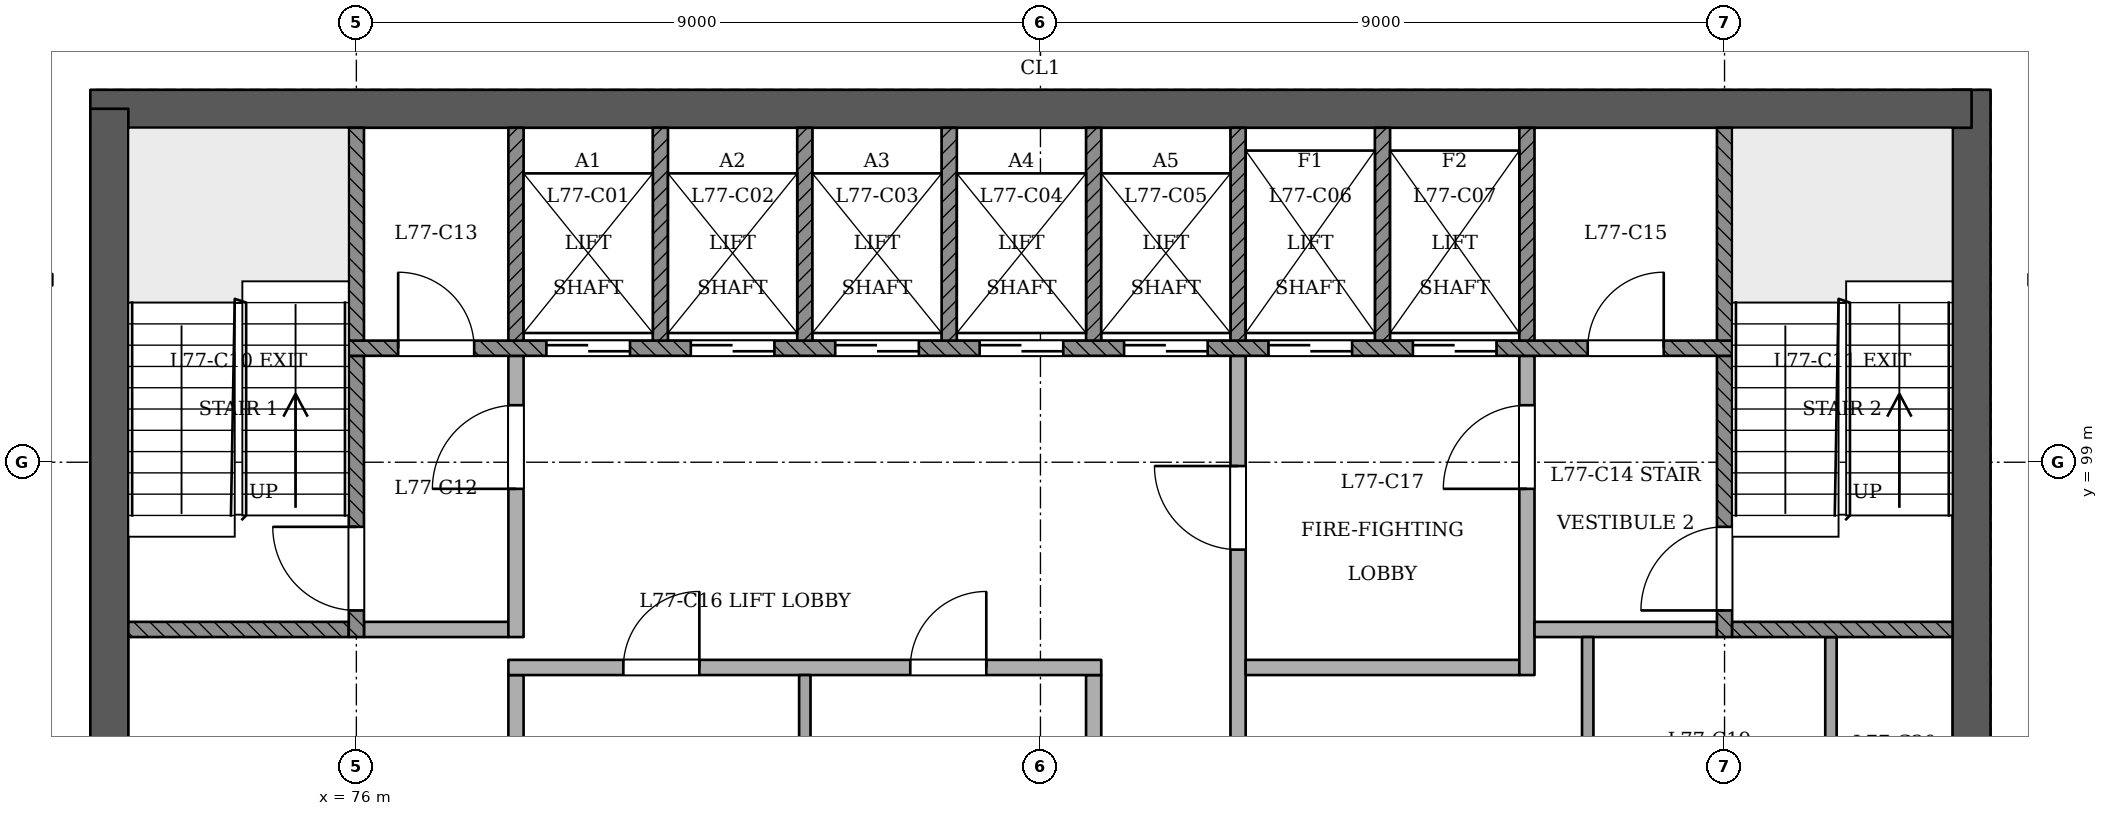
"""IFC4 building model, lengths in metres.
Left out: names, types, materials, properties, quantities, classifications, styles, units other than length and angle.
Written with IfcOpenShell. Run it as: python <this file> out.ifc"""

import sys

from ifc_helpers import new_model, si_unit, direction, frame, frame_2d, origin, place, context, subcontext, project, spatial, rectangle, extrude, element, fill, save


model = new_model("IFC4")
c1 = context("Model", 3, precision=1e-05, world=origin(), true_north=direction((0.0, 1.0)))
c2 = subcontext(c1, "Body", "Model", "MODEL_VIEW")
j1 = project(units=[si_unit("LENGTHUNIT", "METRE"), si_unit("PLANEANGLEUNIT", "RADIAN")], contexts=[c1])
p1 = place(None, origin())
s1 = spatial("IfcSite", under=j1, at=p1, CompositionType="ELEMENT")
p2 = place(p1, origin())
s2 = spatial("IfcBuilding", under=s1, at=p2, CompositionType="ELEMENT")
p3 = place(p2, frame((0.0, 0.0, 298.6)))
s3 = spatial("IfcBuildingStorey", under=s2, at=p3, CompositionType="ELEMENT", Elevation=298.6)
p4 = place(p3, frame((97.25, 93.15, 0.0), z_axis=(0.0, 0.0, 1.0), x_axis=(0.0, 1.0, 0.0)))
e1 = element("IfcWall", 1, at=p4, inside=s3, PredefinedType="SHEAR", context=c2, shape_type="SweptSolid", body=[
    extrude(rectangle(XDim=10.75, YDim=0.5, at=frame_2d((5.375, 0.0))), origin(), (0.0, 0.0, 1.0), 3.6),
])
p5 = place(p3, frame((97.25, 103.65, 0.0), z_axis=(0.0, 0.0, 1.0), x_axis=(-1.0, 0.0, 0.0)))
e2 = element("IfcWall", 2, at=p5, inside=s3, PredefinedType="SHEAR", context=c2, shape_type="SweptSolid", body=[
    extrude(rectangle(XDim=24.75, YDim=0.5, at=frame_2d((12.375, 0.0))), origin(), (0.0, 0.0, 1.0), 3.6),
])
p6 = place(p3, frame((72.75, 103.65, 0.0), z_axis=(0.0, 0.0, 1.0), x_axis=(0.0, -1.0, 0.0)))
e3 = element("IfcWall", 3, at=p6, inside=s3, PredefinedType="SHEAR", context=c2, shape_type="SweptSolid", body=[
    extrude(rectangle(XDim=10.75, YDim=0.5, at=frame_2d((5.375, 0.0))), origin(), (0.0, 0.0, 1.0), 3.6),
])
for number, where, z_axis, x_axis in (
    (4, (99.726, 101.401, 0.0), (0.0, 0.0, 1.0), (-1.0, 0.0, 0.0)),
    (5, (72.0, 101.401, 0.0), (0.0, 0.0, 1.0), (-1.0, -0.0, 0.0)),
):
    element("IfcWall", number, at=place(p3, frame(where, z_axis=z_axis, x_axis=x_axis)), inside=s3, PredefinedType="PARTITIONING", context=c2, shape_type="SweptSolid", body=[
        extrude(rectangle(XDim=1.726, YDim=0.15, at=frame_2d((0.863, 0.0))), origin(), (0.0, 0.0, 1.0), 3.2),
    ])
p7 = place(p3, frame((78.1, 93.4, 0.0), z_axis=(0.0, 0.0, 1.0), x_axis=(0.0, 1.0, 0.0)))
e6 = element("IfcWall", 6, at=p7, inside=s3, PredefinedType="PARTITIONING", context=c2, shape_type="SweptSolid", body=[
    extrude(rectangle(XDim=2.8, YDim=0.2, at=frame_2d((1.4, 0.0))), origin(), (0.0, 0.0, 1.0), 3.2),
])
p8 = place(p3, frame((81.9, 93.4, 0.0), z_axis=(0.0, 0.0, 1.0), x_axis=(0.0, 1.0, 0.0)))
e7 = element("IfcWall", 7, at=p8, inside=s3, PredefinedType="PARTITIONING", context=c2, shape_type="SweptSolid", body=[
    extrude(rectangle(XDim=2.8, YDim=0.15, at=frame_2d((1.4, 0.0))), origin(), (0.0, 0.0, 1.0), 3.2),
])
p9 = place(p3, frame((85.7, 93.4, 0.0), z_axis=(0.0, 0.0, 1.0), x_axis=(0.0, 1.0, 0.0)))
e8 = element("IfcWall", 8, at=p9, inside=s3, PredefinedType="PARTITIONING", context=c2, shape_type="SweptSolid", body=[
    extrude(rectangle(XDim=2.8, YDim=0.2, at=frame_2d((1.4, 0.0))), origin(), (0.0, 0.0, 1.0), 3.2),
])
p10 = place(p3, frame((87.6, 93.4, 0.0), z_axis=(0.0, 0.0, 1.0), x_axis=(0.0, 1.0, 0.0)))
e9 = element("IfcWall", 9, at=p10, inside=s3, PredefinedType="PARTITIONING", context=c2, shape_type="SweptSolid", body=[
    extrude(rectangle(XDim=7.0, YDim=0.2, at=frame_2d((3.5, 0.0))), origin(), (0.0, 0.0, 1.0), 3.2),
])
p11 = place(p10, frame((4.45, 0.0, 0.0)))
e10 = element("IfcOpeningElement", 10, at=p11, cuts=e9, PredefinedType="OPENING", context=c2, shape_type="SweptSolid", body=[
    extrude(rectangle(XDim=1.1, YDim=2.1, at=frame_2d((0.55, 1.05))), frame((0.0, 0.11, 0.0), z_axis=(0.0, -1.0, 0.0), x_axis=(1.0, 0.0, 0.0)), (0.0, 0.0, 1.0), 0.221),
])
for number, where, z_axis, x_axis in (
    (11, (92.2, 93.4, 0.0), (0.0, 0.0, 1.0), (0.0, 1.0, 0.0)),
    (12, (95.4, 93.4, 0.0), (0.0, 0.0, 1.0), (0.0, 1.0, 0.0)),
):
    element("IfcWall", number, at=place(p3, frame(where, z_axis=z_axis, x_axis=x_axis)), inside=s3, PredefinedType="PARTITIONING", context=c2, shape_type="SweptSolid", body=[
        extrude(rectangle(XDim=3.3, YDim=0.15, at=frame_2d((1.65, 0.0))), origin(), (0.0, 0.0, 1.0), 3.2),
    ])
p12 = place(p3, frame((78.0, 96.3, 0.0), z_axis=(0.0, 0.0, 1.0), x_axis=(1.0, 0.0, 0.0)))
e13 = element("IfcWall", 13, at=p12, inside=s3, PredefinedType="PARTITIONING", context=c2, shape_type="SweptSolid", body=[
    extrude(rectangle(XDim=7.8, YDim=0.2, at=frame_2d((3.9, 0.0))), origin(), (0.0, 0.0, 1.0), 3.2),
])
p13 = place(p12, frame((1.512, 0.0, 0.0)))
e14 = element("IfcOpeningElement", 14, at=p13, cuts=e13, PredefinedType="OPENING", context=c2, shape_type="SweptSolid", body=[
    extrude(rectangle(XDim=1.0, YDim=2.1, at=frame_2d((0.5, 1.05))), frame((0.0, 0.11, 0.0), z_axis=(0.0, -1.0, 0.0), x_axis=(1.0, 0.0, 0.0)), (0.0, 0.0, 1.0), 0.221),
])
p14 = place(p12, frame((5.288, 0.0, 0.0)))
e15 = element("IfcOpeningElement", 15, at=p14, cuts=e13, PredefinedType="OPENING", context=c2, shape_type="SweptSolid", body=[
    extrude(rectangle(XDim=1.0, YDim=2.1, at=frame_2d((0.5, 1.05))), frame((0.0, 0.11, 0.0), z_axis=(0.0, -1.0, 0.0), x_axis=(1.0, 0.0, 0.0)), (0.0, 0.0, 1.0), 0.221),
])
p15 = place(p3, frame((87.7, 96.3, 0.0), z_axis=(0.0, 0.0, 1.0), x_axis=(1.0, 0.0, 0.0)))
e16 = element("IfcWall", 16, at=p15, inside=s3, PredefinedType="PARTITIONING", context=c2, shape_type="SweptSolid", body=[
    extrude(rectangle(XDim=3.6, YDim=0.2, at=frame_2d((1.8, 0.0))), origin(), (0.0, 0.0, 1.0), 3.2),
])
p16 = place(p3, frame((91.4, 96.2, 0.0), z_axis=(0.0, 0.0, 1.0), x_axis=(0.0, 1.0, 0.0)))
e17 = element("IfcWall", 17, at=p16, inside=s3, PredefinedType="PARTITIONING", context=c2, shape_type="SweptSolid", body=[
    extrude(rectangle(XDim=4.2, YDim=0.2, at=frame_2d((2.1, 0.0))), origin(), (0.0, 0.0, 1.0), 3.2),
])
p17 = place(p16, frame((2.45, 0.0, 0.0)))
e18 = element("IfcOpeningElement", 18, at=p17, cuts=e17, PredefinedType="OPENING", context=c2, shape_type="SweptSolid", body=[
    extrude(rectangle(XDim=1.1, YDim=2.1, at=frame_2d((0.55, 1.05))), frame((0.0, 0.11, 0.0), z_axis=(0.0, -1.0, 0.0), x_axis=(1.0, 0.0, 0.0)), (0.0, 0.0, 1.0), 0.221),
])
p18 = place(p3, frame((73.0, 96.8, 0.0), z_axis=(0.0, 0.0, 1.0), x_axis=(1.0, 0.0, 0.0)))
e19 = element("IfcWall", 19, at=p18, inside=s3, PredefinedType="SOLIDWALL", context=c2, shape_type="SweptSolid", body=[
    extrude(rectangle(XDim=2.9, YDim=0.2, at=frame_2d((1.45, 0.0))), origin(), (0.0, 0.0, 1.0), 3.2),
])
p19 = place(p3, frame((76.0, 96.7, 0.0), z_axis=(0.0, 0.0, 1.0), x_axis=(0.0, 1.0, 0.0)))
e20 = element("IfcWall", 20, at=p19, inside=s3, PredefinedType="SOLIDWALL", context=c2, shape_type="SweptSolid", body=[
    extrude(rectangle(XDim=3.7, YDim=0.2, at=frame_2d((1.85, 0.0))), origin(), (0.0, 0.0, 1.0), 3.2),
])
p20 = place(p19, frame((0.35, 0.0, 0.0)))
e21 = element("IfcOpeningElement", 21, at=p20, cuts=e20, PredefinedType="OPENING", context=c2, shape_type="SweptSolid", body=[
    extrude(rectangle(XDim=1.1, YDim=2.1, at=frame_2d((0.55, 1.05))), frame((0.0, 0.11, 0.0), z_axis=(0.0, -1.0, 0.0), x_axis=(1.0, 0.0, 0.0)), (0.0, 0.0, 1.0), 0.221),
])
p21 = place(p3, frame((76.1, 96.8, 0.0), z_axis=(0.0, 0.0, 1.0), x_axis=(1.0, 0.0, 0.0)))
e22 = element("IfcWall", 22, at=p21, inside=s3, PredefinedType="PARTITIONING", context=c2, shape_type="SweptSolid", body=[
    extrude(rectangle(XDim=1.9, YDim=0.2, at=frame_2d((0.95, 0.0))), origin(), (0.0, 0.0, 1.0), 3.2),
])
p22 = place(p3, frame((78.1, 96.7, 0.0), z_axis=(0.0, 0.0, 1.0), x_axis=(0.0, 1.0, 0.0)))
e23 = element("IfcWall", 23, at=p22, inside=s3, PredefinedType="PARTITIONING", context=c2, shape_type="SweptSolid", body=[
    extrude(rectangle(XDim=3.7, YDim=0.2, at=frame_2d((1.85, 0.0))), origin(), (0.0, 0.0, 1.0), 3.2),
])
p23 = place(p22, frame((1.95, 0.0, 0.0)))
e24 = element("IfcOpeningElement", 24, at=p23, cuts=e23, PredefinedType="OPENING", context=c2, shape_type="SweptSolid", body=[
    extrude(rectangle(XDim=1.1, YDim=2.1, at=frame_2d((0.55, 1.05))), frame((0.0, 0.11, 0.0), z_axis=(0.0, -1.0, 0.0), x_axis=(1.0, 0.0, 0.0)), (0.0, 0.0, 1.0), 0.221),
])
p24 = place(p3, frame((91.5, 96.8, 0.0), z_axis=(0.0, 0.0, 1.0), x_axis=(1.0, 0.0, 0.0)))
e25 = element("IfcWall", 25, at=p24, inside=s3, PredefinedType="PARTITIONING", context=c2, shape_type="SweptSolid", body=[
    extrude(rectangle(XDim=2.4, YDim=0.2, at=frame_2d((1.2, 0.0))), origin(), (0.0, 0.0, 1.0), 3.2),
])
p25 = place(p3, frame((94.0, 96.7, 0.0), z_axis=(0.0, 0.0, 1.0), x_axis=(0.0, 1.0, 0.0)))
e26 = element("IfcWall", 26, at=p25, inside=s3, PredefinedType="SOLIDWALL", context=c2, shape_type="SweptSolid", body=[
    extrude(rectangle(XDim=3.7, YDim=0.2, at=frame_2d((1.85, 0.0))), origin(), (0.0, 0.0, 1.0), 3.2),
])
p26 = place(p25, frame((0.35, 0.0, 0.0)))
e27 = element("IfcOpeningElement", 27, at=p26, cuts=e26, PredefinedType="OPENING", context=c2, shape_type="SweptSolid", body=[
    extrude(rectangle(XDim=1.1, YDim=2.1, at=frame_2d((0.55, 1.05))), frame((0.0, 0.11, 0.0), z_axis=(0.0, -1.0, 0.0), x_axis=(1.0, 0.0, 0.0)), (0.0, 0.0, 1.0), 0.221),
])
p27 = place(p3, frame((94.1, 96.8, 0.0), z_axis=(0.0, 0.0, 1.0), x_axis=(1.0, 0.0, 0.0)))
e28 = element("IfcWall", 28, at=p27, inside=s3, PredefinedType="SOLIDWALL", context=c2, shape_type="SweptSolid", body=[
    extrude(rectangle(XDim=2.9, YDim=0.2, at=frame_2d((1.45, 0.0))), origin(), (0.0, 0.0, 1.0), 3.2),
])
p28 = place(p3, frame((75.9, 100.5, 0.0), z_axis=(0.0, 0.0, 1.0), x_axis=(1.0, 0.0, 0.0)))
e29 = element("IfcWall", 29, at=p28, inside=s3, PredefinedType="SOLIDWALL", context=c2, shape_type="SweptSolid", body=[
    extrude(rectangle(XDim=18.2, YDim=0.2, at=frame_2d((9.1, 0.0))), origin(), (0.0, 0.0, 1.0), 3.2),
])
p29 = place(p28, frame((2.6, 0.0, 0.0)))
e30 = element("IfcOpeningElement", 30, at=p29, cuts=e29, PredefinedType="OPENING", context=c2, shape_type="SweptSolid", body=[
    extrude(rectangle(XDim=1.1, YDim=2.1, at=frame_2d((0.55, 1.05))), frame((0.0, 0.11, 0.0), z_axis=(0.0, -1.0, 0.0), x_axis=(1.0, 0.0, 0.0)), (0.0, 0.0, 1.0), 0.221),
])
p30 = place(p28, frame((4.5, 0.0, 0.0)))
e31 = element("IfcOpeningElement", 31, at=p30, cuts=e29, PredefinedType="OPENING", context=c2, shape_type="SweptSolid", body=[
    extrude(rectangle(XDim=1.1, YDim=2.1, at=frame_2d((0.55, 1.05))), frame((0.0, 0.11, 0.0), z_axis=(0.0, -1.0, 0.0), x_axis=(1.0, 0.0, 0.0)), (0.0, 0.0, 1.0), 0.221),
])
p31 = place(p28, frame((6.4, 0.0, 0.0)))
e32 = element("IfcOpeningElement", 32, at=p31, cuts=e29, PredefinedType="OPENING", context=c2, shape_type="SweptSolid", body=[
    extrude(rectangle(XDim=1.1, YDim=2.1, at=frame_2d((0.55, 1.05))), frame((0.0, 0.11, 0.0), z_axis=(0.0, -1.0, 0.0), x_axis=(1.0, 0.0, 0.0)), (0.0, 0.0, 1.0), 0.221),
])
p32 = place(p28, frame((8.3, 0.0, 0.0)))
e33 = element("IfcOpeningElement", 33, at=p32, cuts=e29, PredefinedType="OPENING", context=c2, shape_type="SweptSolid", body=[
    extrude(rectangle(XDim=1.1, YDim=2.1, at=frame_2d((0.55, 1.05))), frame((0.0, 0.11, 0.0), z_axis=(0.0, -1.0, 0.0), x_axis=(1.0, 0.0, 0.0)), (0.0, 0.0, 1.0), 0.221),
])
p33 = place(p28, frame((10.2, 0.0, 0.0)))
e34 = element("IfcOpeningElement", 34, at=p33, cuts=e29, PredefinedType="OPENING", context=c2, shape_type="SweptSolid", body=[
    extrude(rectangle(XDim=1.1, YDim=2.1, at=frame_2d((0.55, 1.05))), frame((0.0, 0.11, 0.0), z_axis=(0.0, -1.0, 0.0), x_axis=(1.0, 0.0, 0.0)), (0.0, 0.0, 1.0), 0.221),
])
p34 = place(p28, frame((12.1, 0.0, 0.0)))
e35 = element("IfcOpeningElement", 35, at=p34, cuts=e29, PredefinedType="OPENING", context=c2, shape_type="SweptSolid", body=[
    extrude(rectangle(XDim=1.1, YDim=2.1, at=frame_2d((0.55, 1.05))), frame((0.0, 0.11, 0.0), z_axis=(0.0, -1.0, 0.0), x_axis=(1.0, 0.0, 0.0)), (0.0, 0.0, 1.0), 0.221),
])
p35 = place(p28, frame((14.0, 0.0, 0.0)))
e36 = element("IfcOpeningElement", 36, at=p35, cuts=e29, PredefinedType="OPENING", context=c2, shape_type="SweptSolid", body=[
    extrude(rectangle(XDim=1.1, YDim=2.1, at=frame_2d((0.55, 1.05))), frame((0.0, 0.11, 0.0), z_axis=(0.0, -1.0, 0.0), x_axis=(1.0, 0.0, 0.0)), (0.0, 0.0, 1.0), 0.221),
])
p36 = place(p28, frame((0.65, 0.0, 0.0)))
e37 = element("IfcOpeningElement", 37, at=p36, cuts=e29, PredefinedType="OPENING", context=c2, shape_type="SweptSolid", body=[
    extrude(rectangle(XDim=1.0, YDim=2.1, at=frame_2d((0.5, 1.05))), frame((0.0, 0.11, 0.0), z_axis=(0.0, -1.0, 0.0), x_axis=(1.0, 0.0, 0.0)), (0.0, 0.0, 1.0), 0.221),
])
p37 = place(p28, frame((16.3, 0.0, 0.0)))
e38 = element("IfcOpeningElement", 38, at=p37, cuts=e29, PredefinedType="OPENING", context=c2, shape_type="SweptSolid", body=[
    extrude(rectangle(XDim=1.0, YDim=2.1, at=frame_2d((0.5, 1.05))), frame((0.0, 0.11, 0.0), z_axis=(0.0, -1.0, 0.0), x_axis=(1.0, 0.0, 0.0)), (0.0, 0.0, 1.0), 0.221),
])
for number, where, z_axis, x_axis in (
    (39, (76.0, 100.6, 0.0), (0.0, 0.0, 1.0), (0.0, 1.0, 0.0)),
    (40, (78.1, 100.6, 0.0), (0.0, 0.0, 1.0), (0.0, 1.0, 0.0)),
    (41, (80.0, 100.6, 0.0), (0.0, 0.0, 1.0), (0.0, 1.0, 0.0)),
    (42, (81.9, 100.6, 0.0), (0.0, 0.0, 1.0), (0.0, 1.0, 0.0)),
    (43, (83.8, 100.6, 0.0), (0.0, 0.0, 1.0), (0.0, 1.0, 0.0)),
    (44, (85.7, 100.6, 0.0), (0.0, 0.0, 1.0), (0.0, 1.0, 0.0)),
    (45, (87.6, 100.6, 0.0), (0.0, 0.0, 1.0), (0.0, 1.0, 0.0)),
    (46, (89.5, 100.6, 0.0), (0.0, 0.0, 1.0), (0.0, 1.0, 0.0)),
    (47, (91.4, 100.6, 0.0), (0.0, 0.0, 1.0), (0.0, 1.0, 0.0)),
    (48, (94.0, 100.6, 0.0), (0.0, 0.0, 1.0), (0.0, 1.0, 0.0)),
):
    element("IfcWall", number, at=place(p3, frame(where, z_axis=z_axis, x_axis=x_axis)), inside=s3, PredefinedType="SOLIDWALL", context=c2, shape_type="SweptSolid", body=[
        extrude(rectangle(XDim=2.8, YDim=0.2, at=frame_2d((1.4, 0.0))), origin(), (0.0, 0.0, 1.0), 3.2),
    ])
p38 = place(p29, origin())
e49 = element("IfcDoor", 49, at=p38, inside=s3, OperationType="SLIDING_TO_RIGHT", PredefinedType="NOTDEFINED", context=c2, shape_type="SweptSolid", body=[
    extrude(rectangle(XDim=1.1, YDim=2.1, at=frame_2d((0.55, 1.05))), frame((0.0, 0.025, 0.0), z_axis=(0.0, -1.0, 0.0), x_axis=(1.0, 0.0, 0.0)), (0.0, 0.0, 1.0), 0.05),
])
fill(e30, e49)
p39 = place(p30, origin())
e50 = element("IfcDoor", 50, at=p39, inside=s3, OperationType="SLIDING_TO_LEFT", PredefinedType="NOTDEFINED", context=c2, shape_type="SweptSolid", body=[
    extrude(rectangle(XDim=1.1, YDim=2.1, at=frame_2d((0.55, 1.05))), frame((0.0, 0.025, 0.0), z_axis=(0.0, -1.0, 0.0), x_axis=(1.0, 0.0, 0.0)), (0.0, 0.0, 1.0), 0.05),
])
fill(e31, e50)
p40 = place(p31, origin())
e51 = element("IfcDoor", 51, at=p40, inside=s3, OperationType="SLIDING_TO_RIGHT", PredefinedType="NOTDEFINED", context=c2, shape_type="SweptSolid", body=[
    extrude(rectangle(XDim=1.1, YDim=2.1, at=frame_2d((0.55, 1.05))), frame((0.0, 0.025, 0.0), z_axis=(0.0, -1.0, 0.0), x_axis=(1.0, 0.0, 0.0)), (0.0, 0.0, 1.0), 0.05),
])
fill(e32, e51)
p41 = place(p32, origin())
e52 = element("IfcDoor", 52, at=p41, inside=s3, OperationType="SLIDING_TO_LEFT", PredefinedType="NOTDEFINED", context=c2, shape_type="SweptSolid", body=[
    extrude(rectangle(XDim=1.1, YDim=2.1, at=frame_2d((0.55, 1.05))), frame((0.0, 0.025, 0.0), z_axis=(0.0, -1.0, 0.0), x_axis=(1.0, 0.0, 0.0)), (0.0, 0.0, 1.0), 0.05),
])
fill(e33, e52)
p42 = place(p33, origin())
e53 = element("IfcDoor", 53, at=p42, inside=s3, OperationType="SLIDING_TO_RIGHT", PredefinedType="NOTDEFINED", context=c2, shape_type="SweptSolid", body=[
    extrude(rectangle(XDim=1.1, YDim=2.1, at=frame_2d((0.55, 1.05))), frame((0.0, 0.025, 0.0), z_axis=(0.0, -1.0, 0.0), x_axis=(1.0, 0.0, 0.0)), (0.0, 0.0, 1.0), 0.05),
])
fill(e34, e53)
p43 = place(p34, origin())
e54 = element("IfcDoor", 54, at=p43, inside=s3, OperationType="SLIDING_TO_RIGHT", PredefinedType="NOTDEFINED", context=c2, shape_type="SweptSolid", body=[
    extrude(rectangle(XDim=1.1, YDim=2.1, at=frame_2d((0.55, 1.05))), frame((0.0, 0.025, 0.0), z_axis=(0.0, -1.0, 0.0), x_axis=(1.0, 0.0, 0.0)), (0.0, 0.0, 1.0), 0.05),
])
fill(e35, e54)
p44 = place(p35, origin())
e55 = element("IfcDoor", 55, at=p44, inside=s3, OperationType="SLIDING_TO_LEFT", PredefinedType="NOTDEFINED", context=c2, shape_type="SweptSolid", body=[
    extrude(rectangle(XDim=1.1, YDim=2.1, at=frame_2d((0.55, 1.05))), frame((0.0, 0.025, 0.0), z_axis=(0.0, -1.0, 0.0), x_axis=(1.0, 0.0, 0.0)), (0.0, 0.0, 1.0), 0.05),
])
fill(e36, e55)
p45 = place(p20, origin())
e56 = element("IfcDoor", 56, at=p45, inside=s3, OperationType="SINGLE_SWING_RIGHT", PredefinedType="NOTDEFINED", context=c2, shape_type="SweptSolid", body=[
    extrude(rectangle(XDim=1.1, YDim=2.1, at=frame_2d((0.55, 1.05))), frame((0.0, 0.025, 0.0), z_axis=(0.0, -1.0, 0.0), x_axis=(1.0, 0.0, 0.0)), (0.0, 0.0, 1.0), 0.05),
])
fill(e21, e56)
p46 = place(p26, origin())
e57 = element("IfcDoor", 57, at=p46, inside=s3, OperationType="SINGLE_SWING_LEFT", PredefinedType="NOTDEFINED", context=c2, shape_type="SweptSolid", body=[
    extrude(rectangle(XDim=1.1, YDim=2.1, at=frame_2d((0.55, 1.05))), frame((0.0, 0.025, 0.0), z_axis=(0.0, -1.0, 0.0), x_axis=(1.0, 0.0, 0.0)), (0.0, 0.0, 1.0), 0.05),
])
fill(e27, e57)
p47 = place(p23, origin())
e58 = element("IfcDoor", 58, at=p47, inside=s3, OperationType="SINGLE_SWING_LEFT", PredefinedType="NOTDEFINED", context=c2, shape_type="SweptSolid", body=[
    extrude(rectangle(XDim=1.1, YDim=2.1, at=frame_2d((0.55, 1.05))), frame((0.0, 0.025, 0.0), z_axis=(0.0, -1.0, 0.0), x_axis=(1.0, 0.0, 0.0)), (0.0, 0.0, 1.0), 0.05),
])
fill(e24, e58)
p48 = place(p11, origin())
e59 = element("IfcDoor", 59, at=p48, inside=s3, OperationType="SINGLE_SWING_RIGHT", PredefinedType="NOTDEFINED", context=c2, shape_type="SweptSolid", body=[
    extrude(rectangle(XDim=1.1, YDim=2.1, at=frame_2d((0.55, 1.05))), frame((0.0, 0.025, 0.0), z_axis=(0.0, -1.0, 0.0), x_axis=(1.0, 0.0, 0.0)), (0.0, 0.0, 1.0), 0.05),
])
fill(e10, e59)
p49 = place(p17, origin())
e60 = element("IfcDoor", 60, at=p49, inside=s3, OperationType="SINGLE_SWING_LEFT", PredefinedType="NOTDEFINED", context=c2, shape_type="SweptSolid", body=[
    extrude(rectangle(XDim=1.1, YDim=2.1, at=frame_2d((0.55, 1.05))), frame((0.0, 0.025, 0.0), z_axis=(0.0, -1.0, 0.0), x_axis=(1.0, 0.0, 0.0)), (0.0, 0.0, 1.0), 0.05),
])
fill(e18, e60)
p50 = place(p36, origin())
e61 = element("IfcDoor", 61, at=p50, inside=s3, OperationType="SINGLE_SWING_LEFT", PredefinedType="NOTDEFINED", context=c2, shape_type="SweptSolid", body=[
    extrude(rectangle(XDim=1.0, YDim=2.1, at=frame_2d((0.5, 1.05))), frame((0.0, 0.025, 0.0), z_axis=(0.0, -1.0, 0.0), x_axis=(1.0, 0.0, 0.0)), (0.0, 0.0, 1.0), 0.05),
])
fill(e37, e61)
p51 = place(p37, origin())
e62 = element("IfcDoor", 62, at=p51, inside=s3, OperationType="SINGLE_SWING_RIGHT", PredefinedType="NOTDEFINED", context=c2, shape_type="SweptSolid", body=[
    extrude(rectangle(XDim=1.0, YDim=2.1, at=frame_2d((0.5, 1.05))), frame((0.0, 0.025, 0.0), z_axis=(0.0, -1.0, 0.0), x_axis=(1.0, 0.0, 0.0)), (0.0, 0.0, 1.0), 0.05),
])
fill(e38, e62)
p52 = place(p13, origin())
e63 = element("IfcDoor", 63, at=p52, inside=s3, OperationType="SINGLE_SWING_RIGHT", PredefinedType="NOTDEFINED", context=c2, shape_type="SweptSolid", body=[
    extrude(rectangle(XDim=1.0, YDim=2.1, at=frame_2d((0.5, 1.05))), frame((0.0, 0.025, 0.0), z_axis=(0.0, -1.0, 0.0), x_axis=(1.0, 0.0, 0.0)), (0.0, 0.0, 1.0), 0.05),
])
fill(e14, e63)
p53 = place(p14, origin())
e64 = element("IfcDoor", 64, at=p53, inside=s3, OperationType="SINGLE_SWING_RIGHT", PredefinedType="NOTDEFINED", context=c2, shape_type="SweptSolid", body=[
    extrude(rectangle(XDim=1.0, YDim=2.1, at=frame_2d((0.5, 1.05))), frame((0.0, 0.025, 0.0), z_axis=(0.0, -1.0, 0.0), x_axis=(1.0, 0.0, 0.0)), (0.0, 0.0, 1.0), 0.05),
])
fill(e15, e64)
save(model, sys.argv[1])
